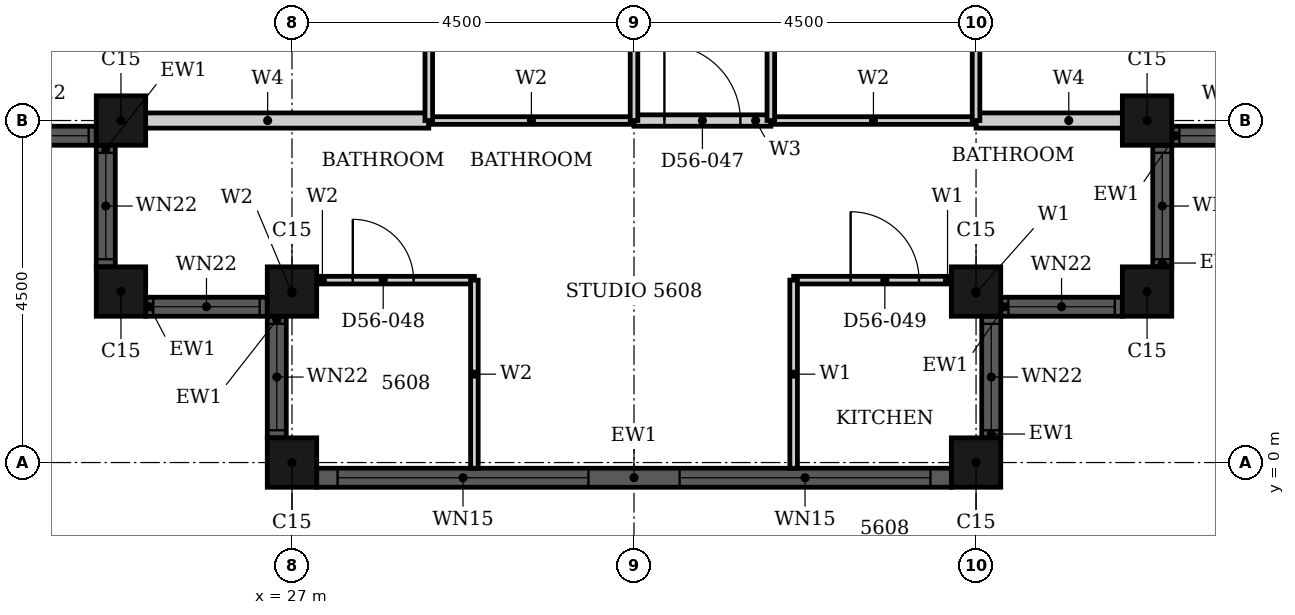
"""IFC4 building model, lengths in metres.
Left out: names, types, materials, properties, quantities, classifications, styles, units other than length and angle.
Written with IfcOpenShell. Run it as: python <this file> out.ifc"""

import sys

from ifc_helpers import new_model, si_unit, direction, frame, frame_2d, origin, origin_2d, place, context, subcontext, project, spatial, rectangle, hollow_rectangle, extrude, element, fill, save


model = new_model("IFC4")
c1 = context("Model", 3, precision=1e-05, world=origin(), true_north=direction((0.0, 1.0)))
c2 = subcontext(c1, "Body", "Model", "MODEL_VIEW")
j1 = project(units=[si_unit("LENGTHUNIT", "METRE"), si_unit("PLANEANGLEUNIT", "RADIAN")], contexts=[c1])
p1 = place(None, origin())
s1 = spatial("IfcSite", under=j1, at=p1, CompositionType="ELEMENT")
p2 = place(p1, origin())
s2 = spatial("IfcBuilding", under=s1, at=p2, CompositionType="ELEMENT")
p3 = place(p2, frame((0.0, 0.0, 222.0)))
s3 = spatial("IfcBuildingStorey", under=s2, at=p3, CompositionType="ELEMENT", Elevation=222.0)
for number, where, z_axis, x_axis in (
    (1, (24.75, 4.5, 0.0), (0.0, 0.0, 1.0), (1.0, 0.0, 0.0)),
    (2, (24.75, 2.25, 0.0), (0.0, 0.0, 1.0), (1.0, 0.0, 0.0)),
    (3, (27.0, 2.25, 0.0), (0.0, 0.0, 1.0), (1.0, 0.0, 0.0)),
    (4, (27.0, 0.0, 0.0), (0.0, 0.0, 1.0), (1.0, 0.0, 0.0)),
    (5, (36.0, 0.0, 0.0), (0.0, 0.0, 1.0), (1.0, 0.0, 0.0)),
    (6, (36.0, 2.25, 0.0), (0.0, 0.0, 1.0), (1.0, 0.0, 0.0)),
    (7, (38.25, 2.25, 0.0), (0.0, 0.0, 1.0), (1.0, 0.0, 0.0)),
    (8, (38.25, 4.5, 0.0), (0.0, 0.0, 1.0), (1.0, 0.0, 0.0)),
):
    element("IfcColumn", number, at=place(p3, frame(where, z_axis=z_axis, x_axis=x_axis)), inside=s3, PredefinedType="COLUMN", context=c2, shape_type="SweptSolid", body=[
        extrude(hollow_rectangle(XDim=0.65, YDim=0.65, WallThickness=0.021, at=origin_2d()), origin(), (0.0, 0.0, 1.0), 3.7),
    ])
p4 = place(p3, frame((22.825, 4.3, 0.0), z_axis=(0.0, 0.0, 1.0), x_axis=(1.0, 0.0, 0.0)))
e9 = element("IfcWall", 9, at=p4, inside=s3, PredefinedType="SOLIDWALL", context=c2, shape_type="SweptSolid", body=[
    extrude(rectangle(XDim=1.6, YDim=0.25, at=frame_2d((0.8, 0.0))), origin(), (0.0, 0.0, 1.0), 3.7),
])
p5 = place(p4, frame((0.1, 0.0, 0.9)))
e10 = element("IfcOpeningElement", 10, at=p5, cuts=e9, PredefinedType="OPENING", context=c2, shape_type="SweptSolid", body=[
    extrude(rectangle(XDim=1.4, YDim=1.85, at=frame_2d((0.7, 0.925))), frame((0.0, 0.135, 0.0), z_axis=(0.0, -1.0, 0.0), x_axis=(1.0, 0.0, 0.0)), (0.0, 0.0, 1.0), 0.27),
])
p6 = place(p3, frame((24.55, 4.175, 0.0), z_axis=(0.0, 0.0, 1.0), x_axis=(0.0, -1.0, 0.0)))
e11 = element("IfcWall", 11, at=p6, inside=s3, PredefinedType="SOLIDWALL", context=c2, shape_type="SweptSolid", body=[
    extrude(rectangle(XDim=1.6, YDim=0.25, at=frame_2d((0.8, 0.0))), origin(), (0.0, 0.0, 1.0), 3.7),
])
p7 = place(p6, frame((0.1, 0.0, 0.9)))
e12 = element("IfcOpeningElement", 12, at=p7, cuts=e11, PredefinedType="OPENING", context=c2, shape_type="SweptSolid", body=[
    extrude(rectangle(XDim=1.4, YDim=1.85, at=frame_2d((0.7, 0.925))), frame((0.0, 0.135, 0.0), z_axis=(0.0, -1.0, 0.0), x_axis=(1.0, 0.0, 0.0)), (0.0, 0.0, 1.0), 0.27),
])
p8 = place(p3, frame((25.075, 2.05, 0.0), z_axis=(0.0, 0.0, 1.0), x_axis=(1.0, 0.0, 0.0)))
e13 = element("IfcWall", 13, at=p8, inside=s3, PredefinedType="SOLIDWALL", context=c2, shape_type="SweptSolid", body=[
    extrude(rectangle(XDim=1.6, YDim=0.25, at=frame_2d((0.8, 0.0))), origin(), (0.0, 0.0, 1.0), 3.7),
])
p9 = place(p8, frame((0.1, 0.0, 0.9)))
e14 = element("IfcOpeningElement", 14, at=p9, cuts=e13, PredefinedType="OPENING", context=c2, shape_type="SweptSolid", body=[
    extrude(rectangle(XDim=1.4, YDim=1.85, at=frame_2d((0.7, 0.925))), frame((0.0, 0.135, 0.0), z_axis=(0.0, -1.0, 0.0), x_axis=(1.0, 0.0, 0.0)), (0.0, 0.0, 1.0), 0.27),
])
p10 = place(p3, frame((26.8, 1.925, 0.0), z_axis=(0.0, 0.0, 1.0), x_axis=(0.0, -1.0, 0.0)))
e15 = element("IfcWall", 15, at=p10, inside=s3, PredefinedType="SOLIDWALL", context=c2, shape_type="SweptSolid", body=[
    extrude(rectangle(XDim=1.6, YDim=0.25, at=frame_2d((0.8, 0.0))), origin(), (0.0, 0.0, 1.0), 3.7),
])
p11 = place(p10, frame((0.1, 0.0, 0.9)))
e16 = element("IfcOpeningElement", 16, at=p11, cuts=e15, PredefinedType="OPENING", context=c2, shape_type="SweptSolid", body=[
    extrude(rectangle(XDim=1.4, YDim=1.85, at=frame_2d((0.7, 0.925))), frame((0.0, 0.135, 0.0), z_axis=(0.0, -1.0, 0.0), x_axis=(1.0, 0.0, 0.0)), (0.0, 0.0, 1.0), 0.27),
])
p12 = place(p3, frame((27.325, -0.2, 0.0), z_axis=(0.0, 0.0, 1.0), x_axis=(1.0, 0.0, 0.0)))
e17 = element("IfcWall", 17, at=p12, inside=s3, PredefinedType="SOLIDWALL", context=c2, shape_type="SweptSolid", body=[
    extrude(rectangle(XDim=8.35, YDim=0.25, at=frame_2d((4.175, 0.0))), origin(), (0.0, 0.0, 1.0), 3.7),
])
p13 = place(p12, frame((0.275, 0.0, 0.45)))
e18 = element("IfcOpeningElement", 18, at=p13, cuts=e17, PredefinedType="OPENING", context=c2, shape_type="SweptSolid", body=[
    extrude(rectangle(XDim=3.3, YDim=2.3, at=frame_2d((1.65, 1.15))), frame((0.0, 0.135, 0.0), z_axis=(0.0, -1.0, 0.0), x_axis=(1.0, 0.0, 0.0)), (0.0, 0.0, 1.0), 0.27),
])
p14 = place(p12, frame((4.775, 0.0, 0.45)))
e19 = element("IfcOpeningElement", 19, at=p14, cuts=e17, PredefinedType="OPENING", context=c2, shape_type="SweptSolid", body=[
    extrude(rectangle(XDim=3.3, YDim=2.3, at=frame_2d((1.65, 1.15))), frame((0.0, 0.135, 0.0), z_axis=(0.0, -1.0, 0.0), x_axis=(1.0, 0.0, 0.0)), (0.0, 0.0, 1.0), 0.27),
])
p15 = place(p3, frame((36.2, 0.325, 0.0), z_axis=(0.0, 0.0, 1.0), x_axis=(0.0, 1.0, 0.0)))
e20 = element("IfcWall", 20, at=p15, inside=s3, PredefinedType="SOLIDWALL", context=c2, shape_type="SweptSolid", body=[
    extrude(rectangle(XDim=1.6, YDim=0.25, at=frame_2d((0.8, 0.0))), origin(), (0.0, 0.0, 1.0), 3.7),
])
p16 = place(p15, frame((0.1, 0.0, 0.9)))
e21 = element("IfcOpeningElement", 21, at=p16, cuts=e20, PredefinedType="OPENING", context=c2, shape_type="SweptSolid", body=[
    extrude(rectangle(XDim=1.4, YDim=1.85, at=frame_2d((0.7, 0.925))), frame((0.0, 0.135, 0.0), z_axis=(0.0, -1.0, 0.0), x_axis=(1.0, 0.0, 0.0)), (0.0, 0.0, 1.0), 0.27),
])
p17 = place(p3, frame((36.325, 2.05, 0.0), z_axis=(0.0, 0.0, 1.0), x_axis=(1.0, 0.0, 0.0)))
e22 = element("IfcWall", 22, at=p17, inside=s3, PredefinedType="SOLIDWALL", context=c2, shape_type="SweptSolid", body=[
    extrude(rectangle(XDim=1.6, YDim=0.25, at=frame_2d((0.8, 0.0))), origin(), (0.0, 0.0, 1.0), 3.7),
])
p18 = place(p17, frame((0.1, 0.0, 0.9)))
e23 = element("IfcOpeningElement", 23, at=p18, cuts=e22, PredefinedType="OPENING", context=c2, shape_type="SweptSolid", body=[
    extrude(rectangle(XDim=1.4, YDim=1.85, at=frame_2d((0.7, 0.925))), frame((0.0, 0.135, 0.0), z_axis=(0.0, -1.0, 0.0), x_axis=(1.0, 0.0, 0.0)), (0.0, 0.0, 1.0), 0.27),
])
p19 = place(p3, frame((38.45, 2.575, 0.0), z_axis=(0.0, 0.0, 1.0), x_axis=(0.0, 1.0, 0.0)))
e24 = element("IfcWall", 24, at=p19, inside=s3, PredefinedType="SOLIDWALL", context=c2, shape_type="SweptSolid", body=[
    extrude(rectangle(XDim=1.6, YDim=0.25, at=frame_2d((0.8, 0.0))), origin(), (0.0, 0.0, 1.0), 3.7),
])
p20 = place(p19, frame((0.1, 0.0, 0.9)))
e25 = element("IfcOpeningElement", 25, at=p20, cuts=e24, PredefinedType="OPENING", context=c2, shape_type="SweptSolid", body=[
    extrude(rectangle(XDim=1.4, YDim=1.85, at=frame_2d((0.7, 0.925))), frame((0.0, 0.135, 0.0), z_axis=(0.0, -1.0, 0.0), x_axis=(1.0, 0.0, 0.0)), (0.0, 0.0, 1.0), 0.27),
])
p21 = place(p3, frame((38.575, 4.3, 0.0), z_axis=(0.0, 0.0, 1.0), x_axis=(1.0, 0.0, 0.0)))
e26 = element("IfcWall", 26, at=p21, inside=s3, PredefinedType="SOLIDWALL", context=c2, shape_type="SweptSolid", body=[
    extrude(rectangle(XDim=1.6, YDim=0.25, at=frame_2d((0.8, 0.0))), origin(), (0.0, 0.0, 1.0), 3.7),
])
p22 = place(p21, frame((0.1, 0.0, 0.9)))
e27 = element("IfcOpeningElement", 27, at=p22, cuts=e26, PredefinedType="OPENING", context=c2, shape_type="SweptSolid", body=[
    extrude(rectangle(XDim=1.4, YDim=1.85, at=frame_2d((0.7, 0.925))), frame((0.0, 0.135, 0.0), z_axis=(0.0, -1.0, 0.0), x_axis=(1.0, 0.0, 0.0)), (0.0, 0.0, 1.0), 0.27),
])
p23 = place(p3, frame((31.5, 4.5, 0.0), z_axis=(0.0, 0.0, 1.0), x_axis=(1.0, 0.0, 0.0)))
e28 = element("IfcWall", 28, at=p23, inside=s3, PredefinedType="PARTITIONING", context=c2, shape_type="SweptSolid", body=[
    extrude(rectangle(XDim=1.8, YDim=0.15, at=frame_2d((0.9, 0.0))), origin(), (0.0, 0.0, 1.0), 3.4),
])
p24 = place(p23, frame((0.4, 0.0, 0.0)))
e29 = element("IfcOpeningElement", 29, at=p24, cuts=e28, PredefinedType="OPENING", context=c2, shape_type="SweptSolid", body=[
    extrude(rectangle(XDim=1.0, YDim=2.2, at=frame_2d((0.5, 1.1))), frame((0.0, 0.085, 0.0), z_axis=(0.0, -1.0, 0.0), x_axis=(1.0, 0.0, 0.0)), (0.0, 0.0, 1.0), 0.17),
])
p25 = place(p3, frame((33.6, 2.4, 0.0), z_axis=(0.0, 0.0, 1.0), x_axis=(1.0, 0.0, 0.0)))
e30 = element("IfcWall", 30, at=p25, inside=s3, PredefinedType="PARTITIONING", context=c2, shape_type="SweptSolid", body=[
    extrude(rectangle(XDim=2.4, YDim=0.1, at=frame_2d((1.2, 0.0))), origin(), (0.0, 0.0, 1.0), 3.4),
])
p26 = place(p25, frame((0.75, 0.0, 0.0)))
e31 = element("IfcOpeningElement", 31, at=p26, cuts=e30, PredefinedType="OPENING", context=c2, shape_type="SweptSolid", body=[
    extrude(rectangle(XDim=0.9, YDim=2.1, at=frame_2d((0.45, 1.05))), frame((0.0, 0.06, 0.0), z_axis=(0.0, -1.0, 0.0), x_axis=(1.0, 0.0, 0.0)), (0.0, 0.0, 1.0), 0.12),
])
p27 = place(p3, frame((33.6, -0.075, 0.0), z_axis=(0.0, 0.0, 1.0), x_axis=(0.0, 1.0, 0.0)))
e32 = element("IfcWall", 32, at=p27, inside=s3, PredefinedType="PARTITIONING", context=c2, shape_type="SweptSolid", body=[
    extrude(rectangle(XDim=2.475, YDim=0.1, at=frame_2d((1.237, 0.0))), origin(), (0.0, 0.0, 1.0), 3.4),
])
p28 = place(p3, frame((36.0, 2.06, 0.0), z_axis=(0.0, 0.0, 1.0), x_axis=(0.0, 1.0, 0.0)))
e33 = element("IfcWall", 33, at=p28, inside=s3, PredefinedType="PARTITIONING", context=c2, shape_type="SweptSolid", body=[
    extrude(rectangle(XDim=0.34, YDim=0.1, at=frame_2d((0.17, 0.0))), origin(), (0.0, 0.0, 1.0), 3.4),
])
p29 = place(p3, frame((36.0, 4.5, 0.0), z_axis=(0.0, 0.0, 1.0), x_axis=(1.0, 0.0, 0.0)))
e34 = element("IfcWall", 34, at=p29, inside=s3, PredefinedType="PARTITIONING", context=c2, shape_type="SweptSolid", body=[
    extrude(rectangle(XDim=2.44, YDim=0.2, at=frame_2d((1.22, 0.0))), origin(), (0.0, 0.0, 1.0), 3.4),
])
p30 = place(p3, frame((24.56, 4.5, 0.0), z_axis=(0.0, 0.0, 1.0), x_axis=(1.0, 0.0, 0.0)))
e35 = element("IfcWall", 35, at=p30, inside=s3, PredefinedType="PARTITIONING", context=c2, shape_type="SweptSolid", body=[
    extrude(rectangle(XDim=4.24, YDim=0.2, at=frame_2d((2.12, 0.0))), origin(), (0.0, 0.0, 1.0), 3.4),
])
p31 = place(p3, frame((27.0, 2.4, 0.0), z_axis=(0.0, 0.0, 1.0), x_axis=(1.0, 0.0, 0.0)))
e36 = element("IfcWall", 36, at=p31, inside=s3, PredefinedType="PARTITIONING", context=c2, shape_type="SweptSolid", body=[
    extrude(rectangle(XDim=2.4, YDim=0.1, at=frame_2d((1.2, 0.0))), origin(), (0.0, 0.0, 1.0), 3.4),
])
p32 = place(p31, frame((0.8, 0.0, 0.0)))
e37 = element("IfcOpeningElement", 37, at=p32, cuts=e36, PredefinedType="OPENING", context=c2, shape_type="SweptSolid", body=[
    extrude(rectangle(XDim=0.8, YDim=2.1, at=frame_2d((0.4, 1.05))), frame((0.0, 0.06, 0.0), z_axis=(0.0, -1.0, 0.0), x_axis=(1.0, 0.0, 0.0)), (0.0, 0.0, 1.0), 0.12),
])
for number, where, z_axis, x_axis in (
    (38, (33.3, 4.5, 0.0), (0.0, 0.0, 1.0), (1.0, 0.0, 0.0)),
    (39, (28.8, 4.5, 0.0), (0.0, 0.0, 1.0), (1.0, 0.0, 0.0)),
):
    element("IfcWall", number, at=place(p3, frame(where, z_axis=z_axis, x_axis=x_axis)), inside=s3, PredefinedType="PARTITIONING", context=c2, shape_type="SweptSolid", body=[
        extrude(rectangle(XDim=2.7, YDim=0.1, at=frame_2d((1.35, 0.0))), origin(), (0.0, 0.0, 1.0), 3.4),
    ])
p33 = place(p3, frame((27.0, 2.06, 0.0), z_axis=(0.0, 0.0, 1.0), x_axis=(0.0, 1.0, 0.0)))
e40 = element("IfcWall", 40, at=p33, inside=s3, PredefinedType="PARTITIONING", context=c2, shape_type="SweptSolid", body=[
    extrude(rectangle(XDim=0.34, YDim=0.1, at=frame_2d((0.17, 0.0))), origin(), (0.0, 0.0, 1.0), 3.4),
])
p34 = place(p3, frame((28.8, 4.5, 0.0), z_axis=(0.0, 0.0, 1.0), x_axis=(0.0, 1.0, 0.0)))
e41 = element("IfcWall", 41, at=p34, inside=s3, PredefinedType="PARTITIONING", context=c2, shape_type="SweptSolid", body=[
    extrude(rectangle(XDim=2.4, YDim=0.1, at=frame_2d((1.2, 0.0))), origin(), (0.0, 0.0, 1.0), 3.4),
])
p35 = place(p3, frame((29.4, -0.075, 0.0), z_axis=(0.0, 0.0, 1.0), x_axis=(0.0, 1.0, 0.0)))
e42 = element("IfcWall", 42, at=p35, inside=s3, PredefinedType="PARTITIONING", context=c2, shape_type="SweptSolid", body=[
    extrude(rectangle(XDim=2.475, YDim=0.1, at=frame_2d((1.237, 0.0))), origin(), (0.0, 0.0, 1.0), 3.4),
])
p36 = place(p3, frame((31.5, 4.5, 0.0), z_axis=(0.0, 0.0, 1.0), x_axis=(0.0, 1.0, 0.0)))
e43 = element("IfcWall", 43, at=p36, inside=s3, PredefinedType="PARTITIONING", context=c2, shape_type="SweptSolid", body=[
    extrude(rectangle(XDim=2.4, YDim=0.1, at=frame_2d((1.2, 0.0))), origin(), (0.0, 0.0, 1.0), 2.68),
])
p37 = place(p3, frame((33.3, 4.5, 0.0), z_axis=(0.0, 0.0, 1.0), x_axis=(0.0, 1.0, 0.0)))
e44 = element("IfcWall", 44, at=p37, inside=s3, PredefinedType="PARTITIONING", context=c2, shape_type="SweptSolid", body=[
    extrude(rectangle(XDim=2.4, YDim=0.1, at=frame_2d((1.2, 0.0))), origin(), (0.0, 0.0, 1.0), 3.4),
])
p38 = place(p3, frame((36.0, 4.5, 0.0), z_axis=(0.0, 0.0, 1.0), x_axis=(0.0, 1.0, 0.0)))
e45 = element("IfcWall", 45, at=p38, inside=s3, PredefinedType="PARTITIONING", context=c2, shape_type="SweptSolid", body=[
    extrude(rectangle(XDim=2.4, YDim=0.1, at=frame_2d((1.2, 0.0))), origin(), (0.0, 0.0, 1.0), 2.68),
])
p39 = place(p5, origin())
e46 = element("IfcWindow", 46, at=p39, inside=s3, PartitioningType="SINGLE_PANEL", PredefinedType="WINDOW", context=c2, shape_type="SweptSolid", body=[
    extrude(rectangle(XDim=1.4, YDim=1.85, at=frame_2d((0.7, 0.925))), frame((0.0, 0.03, 0.0), z_axis=(0.0, -1.0, 0.0), x_axis=(1.0, 0.0, 0.0)), (0.0, 0.0, 1.0), 0.06),
])
fill(e10, e46)
p40 = place(p7, origin())
e47 = element("IfcWindow", 47, at=p40, inside=s3, PartitioningType="SINGLE_PANEL", PredefinedType="WINDOW", context=c2, shape_type="SweptSolid", body=[
    extrude(rectangle(XDim=1.4, YDim=1.85, at=frame_2d((0.7, 0.925))), frame((0.0, 0.03, 0.0), z_axis=(0.0, -1.0, 0.0), x_axis=(1.0, 0.0, 0.0)), (0.0, 0.0, 1.0), 0.06),
])
fill(e12, e47)
p41 = place(p9, origin())
e48 = element("IfcWindow", 48, at=p41, inside=s3, PartitioningType="SINGLE_PANEL", PredefinedType="WINDOW", context=c2, shape_type="SweptSolid", body=[
    extrude(rectangle(XDim=1.4, YDim=1.85, at=frame_2d((0.7, 0.925))), frame((0.0, 0.03, 0.0), z_axis=(0.0, -1.0, 0.0), x_axis=(1.0, 0.0, 0.0)), (0.0, 0.0, 1.0), 0.06),
])
fill(e14, e48)
p42 = place(p11, origin())
e49 = element("IfcWindow", 49, at=p42, inside=s3, PartitioningType="SINGLE_PANEL", PredefinedType="WINDOW", context=c2, shape_type="SweptSolid", body=[
    extrude(rectangle(XDim=1.4, YDim=1.85, at=frame_2d((0.7, 0.925))), frame((0.0, 0.03, 0.0), z_axis=(0.0, -1.0, 0.0), x_axis=(1.0, 0.0, 0.0)), (0.0, 0.0, 1.0), 0.06),
])
fill(e16, e49)
p43 = place(p13, origin())
e50 = element("IfcWindow", 50, at=p43, inside=s3, PartitioningType="SINGLE_PANEL", PredefinedType="WINDOW", context=c2, shape_type="SweptSolid", body=[
    extrude(rectangle(XDim=3.3, YDim=2.3, at=frame_2d((1.65, 1.15))), frame((0.0, 0.03, 0.0), z_axis=(0.0, -1.0, 0.0), x_axis=(1.0, 0.0, 0.0)), (0.0, 0.0, 1.0), 0.06),
])
fill(e18, e50)
p44 = place(p14, origin())
e51 = element("IfcWindow", 51, at=p44, inside=s3, PartitioningType="SINGLE_PANEL", PredefinedType="WINDOW", context=c2, shape_type="SweptSolid", body=[
    extrude(rectangle(XDim=3.3, YDim=2.3, at=frame_2d((1.65, 1.15))), frame((0.0, 0.03, 0.0), z_axis=(0.0, -1.0, 0.0), x_axis=(1.0, 0.0, 0.0)), (0.0, 0.0, 1.0), 0.06),
])
fill(e19, e51)
p45 = place(p16, origin())
e52 = element("IfcWindow", 52, at=p45, inside=s3, PartitioningType="SINGLE_PANEL", PredefinedType="WINDOW", context=c2, shape_type="SweptSolid", body=[
    extrude(rectangle(XDim=1.4, YDim=1.85, at=frame_2d((0.7, 0.925))), frame((0.0, 0.03, 0.0), z_axis=(0.0, -1.0, 0.0), x_axis=(1.0, 0.0, 0.0)), (0.0, 0.0, 1.0), 0.06),
])
fill(e21, e52)
p46 = place(p18, origin())
e53 = element("IfcWindow", 53, at=p46, inside=s3, PartitioningType="SINGLE_PANEL", PredefinedType="WINDOW", context=c2, shape_type="SweptSolid", body=[
    extrude(rectangle(XDim=1.4, YDim=1.85, at=frame_2d((0.7, 0.925))), frame((0.0, 0.03, 0.0), z_axis=(0.0, -1.0, 0.0), x_axis=(1.0, 0.0, 0.0)), (0.0, 0.0, 1.0), 0.06),
])
fill(e23, e53)
p47 = place(p20, origin())
e54 = element("IfcWindow", 54, at=p47, inside=s3, PartitioningType="SINGLE_PANEL", PredefinedType="WINDOW", context=c2, shape_type="SweptSolid", body=[
    extrude(rectangle(XDim=1.4, YDim=1.85, at=frame_2d((0.7, 0.925))), frame((0.0, 0.03, 0.0), z_axis=(0.0, -1.0, 0.0), x_axis=(1.0, 0.0, 0.0)), (0.0, 0.0, 1.0), 0.06),
])
fill(e25, e54)
p48 = place(p22, origin())
e55 = element("IfcWindow", 55, at=p48, inside=s3, PartitioningType="SINGLE_PANEL", PredefinedType="WINDOW", context=c2, shape_type="SweptSolid", body=[
    extrude(rectangle(XDim=1.4, YDim=1.85, at=frame_2d((0.7, 0.925))), frame((0.0, 0.03, 0.0), z_axis=(0.0, -1.0, 0.0), x_axis=(1.0, 0.0, 0.0)), (0.0, 0.0, 1.0), 0.06),
])
fill(e27, e55)
p49 = place(p24, origin())
e56 = element("IfcDoor", 56, at=p49, inside=s3, OperationType="SINGLE_SWING_RIGHT", PredefinedType="DOOR", context=c2, shape_type="SweptSolid", body=[
    extrude(rectangle(XDim=1.0, YDim=2.2, at=frame_2d((0.5, 1.1))), frame((0.0, 0.025, 0.0), z_axis=(0.0, -1.0, 0.0), x_axis=(1.0, 0.0, 0.0)), (0.0, 0.0, 1.0), 0.05),
])
fill(e29, e56)
p50 = place(p32, origin())
e57 = element("IfcDoor", 57, at=p50, inside=s3, OperationType="SINGLE_SWING_RIGHT", PredefinedType="DOOR", context=c2, shape_type="SweptSolid", body=[
    extrude(rectangle(XDim=0.8, YDim=2.1, at=frame_2d((0.4, 1.05))), frame((0.0, 0.025, 0.0), z_axis=(0.0, -1.0, 0.0), x_axis=(1.0, 0.0, 0.0)), (0.0, 0.0, 1.0), 0.05),
])
fill(e37, e57)
p51 = place(p26, origin())
e58 = element("IfcDoor", 58, at=p51, inside=s3, OperationType="SINGLE_SWING_RIGHT", PredefinedType="DOOR", context=c2, shape_type="SweptSolid", body=[
    extrude(rectangle(XDim=0.9, YDim=2.1, at=frame_2d((0.45, 1.05))), frame((0.0, 0.025, 0.0), z_axis=(0.0, -1.0, 0.0), x_axis=(1.0, 0.0, 0.0)), (0.0, 0.0, 1.0), 0.05),
])
fill(e31, e58)
save(model, sys.argv[1])
